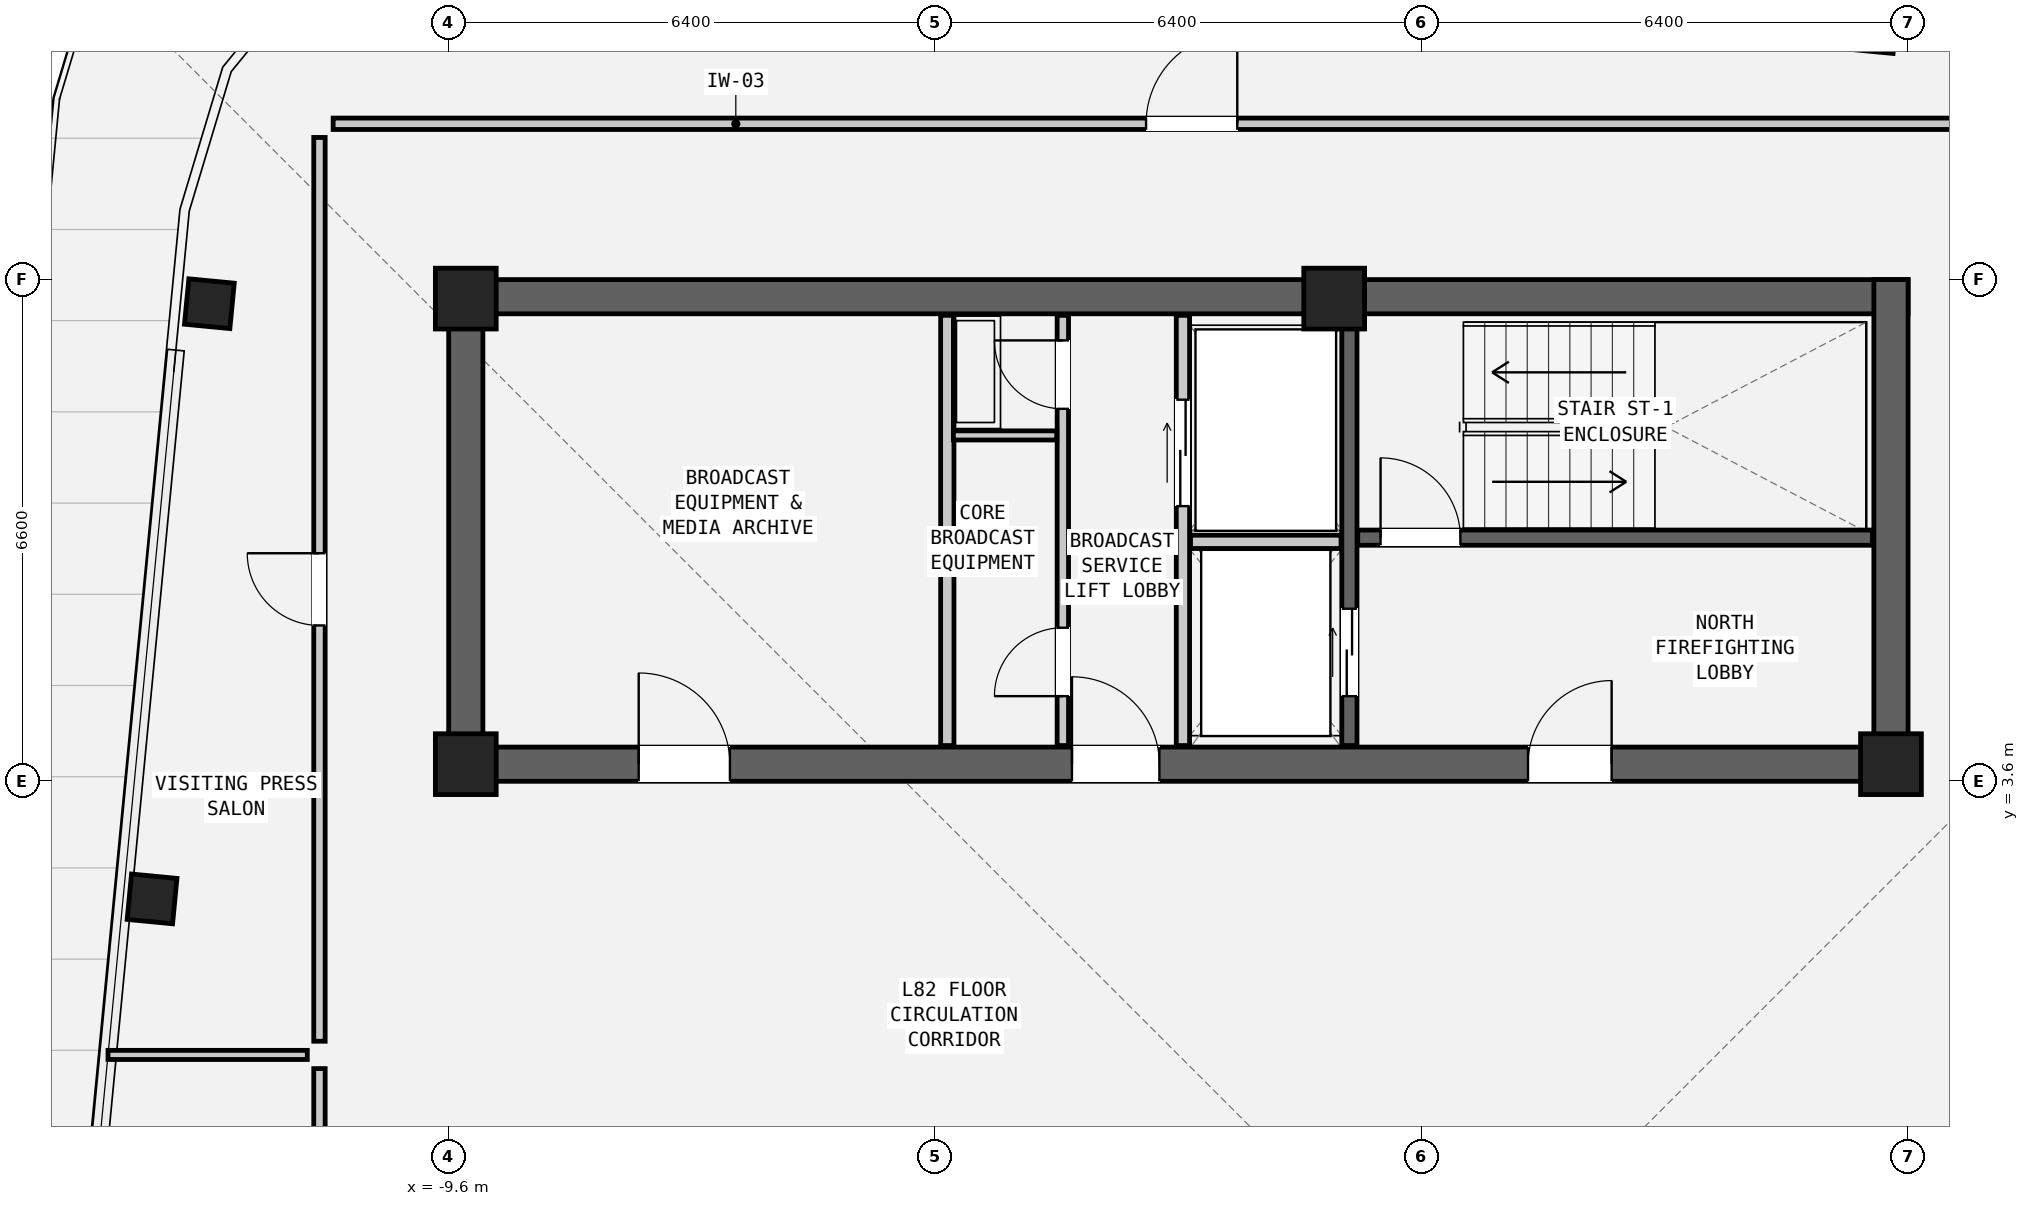
"""IFC4 building model, lengths in metres.
Left out: names, types, materials, properties, quantities, classifications, styles, units other than length and angle.
Written with IfcOpenShell. Run it as: python <this file> out.ifc"""

import sys

from ifc_helpers import new_model, si_unit, direction, frame, frame_2d, origin, origin_2d, place, context, subcontext, project, spatial, rectangle, hollow_rectangle, extrude, element, fill, save


model = new_model("IFC4")
c1 = context("Model", 3, precision=1e-05, world=origin(), true_north=direction((0.0, 1.0)))
c2 = subcontext(c1, "Body", "Model", "MODEL_VIEW")
j1 = project(units=[si_unit("LENGTHUNIT", "METRE"), si_unit("PLANEANGLEUNIT", "RADIAN")], contexts=[c1])
p1 = place(None, origin())
s1 = spatial("IfcSite", under=j1, at=p1, CompositionType="ELEMENT")
p2 = place(p1, origin())
s2 = spatial("IfcBuilding", under=s1, at=p2, CompositionType="ELEMENT")
p3 = place(p2, frame((0.0, 0.0, 276.95)))
s3 = spatial("IfcBuildingStorey", under=s2, at=p3, CompositionType="ELEMENT", Elevation=276.95)
p4 = place(p3, frame((-9.6, 9.975, 0.0), z_axis=(0.0, 0.0, 1.0), x_axis=(1.0, 0.0, 0.0)))
e1 = element("IfcWall", 1, at=p4, inside=s3, PredefinedType="SHEAR", context=c2, shape_type="SweptSolid", body=[
    extrude(rectangle(XDim=19.2, YDim=0.45, at=frame_2d((9.6, 0.0))), origin(), (0.0, 0.0, 1.0), 3.6),
])
p5 = place(p3, frame((-9.6, 3.825, 0.0), z_axis=(0.0, 0.0, 1.0), x_axis=(1.0, 0.0, 0.0)))
e2 = element("IfcWall", 2, at=p5, inside=s3, PredefinedType="SHEAR", context=c2, shape_type="SweptSolid", body=[
    extrude(rectangle(XDim=19.2, YDim=0.45, at=frame_2d((9.6, 0.0))), origin(), (0.0, 0.0, 1.0), 3.6),
])
p6 = place(p5, frame((14.2, 0.0, 0.0)))
e3 = element("IfcOpeningElement", 3, at=p6, cuts=e2, PredefinedType="OPENING", context=c2, shape_type="SweptSolid", body=[
    extrude(rectangle(XDim=1.1, YDim=2.08, at=frame_2d((0.55, 1.04))), frame((0.0, 0.237, 0.0), z_axis=(0.0, -1.0, 0.0), x_axis=(1.0, 0.0, 0.0)), (0.0, 0.0, 1.0), 0.474),
])
p7 = place(p5, frame((8.2, 0.0, 0.0)))
e4 = element("IfcOpeningElement", 4, at=p7, cuts=e2, PredefinedType="OPENING", context=c2, shape_type="SweptSolid", body=[
    extrude(rectangle(XDim=1.15, YDim=2.1, at=frame_2d((0.575, 1.05))), frame((0.0, 0.237, 0.0), z_axis=(0.0, -1.0, 0.0), x_axis=(1.0, 0.0, 0.0)), (0.0, 0.0, 1.0), 0.474),
])
p8 = place(p5, frame((2.5, 0.0, 0.0)))
e5 = element("IfcOpeningElement", 5, at=p8, cuts=e2, PredefinedType="OPENING", context=c2, shape_type="SweptSolid", body=[
    extrude(rectangle(XDim=1.2, YDim=2.1, at=frame_2d((0.6, 1.05))), frame((0.0, 0.237, 0.0), z_axis=(0.0, -1.0, 0.0), x_axis=(1.0, 0.0, 0.0)), (0.0, 0.0, 1.0), 0.474),
])
for number, where, z_axis, x_axis in (
    (6, (-9.375, 3.6, 0.0), (0.0, 0.0, 1.0), (0.0, 1.0, 0.0)),
    (7, (9.375, 3.6, 0.0), (0.0, 0.0, 1.0), (0.0, 1.0, 0.0)),
):
    element("IfcWall", number, at=place(p3, frame(where, z_axis=z_axis, x_axis=x_axis)), inside=s3, PredefinedType="SHEAR", context=c2, shape_type="SweptSolid", body=[
        extrude(rectangle(XDim=6.6, YDim=0.45, at=frame_2d((3.3, 0.0))), origin(), (0.0, 0.0, 1.0), 3.6),
    ])
for number, where, z_axis, x_axis in (
    (8, (9.133, 13.502, 0.0), (0.0, 0.0, 1.0), (0.995, -0.096, 0.0)),
    (9, (-12.749, 9.883, 0.0), (0.0, 0.0, 1.0), (0.096, 0.995, 0.0)),
    (10, (-13.502, 2.052, 0.0), (0.0, 0.0, 1.0), (0.096, 0.995, 0.0)),
):
    element("IfcColumn", number, at=place(p3, frame(where, z_axis=z_axis, x_axis=x_axis)), inside=s3, PredefinedType="COLUMN", context=c2, shape_type="SweptSolid", body=[
        extrude(hollow_rectangle(XDim=0.6, YDim=0.6, WallThickness=0.04, at=origin_2d()), origin(), (0.0, 0.0, 1.0), 3.6),
    ])
for number, where, z_axis, x_axis in (
    (11, (-9.375, 9.95, 0.0), (0.0, 0.0, 1.0), (1.0, 0.0, 0.0)),
    (12, (2.05, 9.95, 0.0), (0.0, 0.0, 1.0), (1.0, 0.0, 0.0)),
    (13, (-9.375, 3.825, 0.0), (0.0, 0.0, 1.0), (1.0, 0.0, 0.0)),
    (14, (9.375, 3.825, 0.0), (0.0, 0.0, 1.0), (1.0, 0.0, 0.0)),
):
    element("IfcColumn", number, at=place(p3, frame(where, z_axis=z_axis, x_axis=x_axis)), inside=s3, PredefinedType="COLUMN", context=c2, shape_type="SweptSolid", body=[
        extrude(rectangle(XDim=0.8, YDim=0.8, at=origin_2d()), origin(), (0.0, 0.0, 1.0), 3.6),
    ])
p9 = place(p3, frame((2.36, 6.805, 0.0), z_axis=(0.0, 0.0, 1.0), x_axis=(1.0, 0.0, 0.0)))
e15 = element("IfcWall", 15, at=p9, inside=s3, PredefinedType="SHEAR", context=c2, shape_type="SweptSolid", body=[
    extrude(rectangle(XDim=6.77, YDim=0.2, at=frame_2d((3.385, 0.0))), origin(), (0.0, 0.0, 1.0), 3.41),
])
p10 = place(p9, frame((0.3, 0.0, 0.0)))
e16 = element("IfcOpeningElement", 16, at=p10, cuts=e15, PredefinedType="OPENING", context=c2, shape_type="SweptSolid", body=[
    extrude(rectangle(XDim=1.05, YDim=2.08, at=frame_2d((0.525, 1.04))), frame((0.0, 0.112, 0.0), z_axis=(0.0, -1.0, 0.0), x_axis=(1.0, 0.0, 0.0)), (0.0, 0.0, 1.0), 0.224),
])
p11 = place(p3, frame((2.25, 4.07, 0.0), z_axis=(0.0, 0.0, 1.0), x_axis=(0.0, 1.0, 0.0)))
e17 = element("IfcWall", 17, at=p11, inside=s3, PredefinedType="SHEAR", context=c2, shape_type="SweptSolid", body=[
    extrude(rectangle(XDim=5.66, YDim=0.2, at=frame_2d((2.83, 0.0))), origin(), (0.0, 0.0, 1.0), 3.41),
])
p12 = place(p11, frame((0.65, 0.0, 0.0)))
e18 = element("IfcOpeningElement", 18, at=p12, cuts=e17, PredefinedType="OPENING", context=c2, shape_type="SweptSolid", body=[
    extrude(rectangle(XDim=1.15, YDim=2.08, at=frame_2d((0.575, 1.04))), frame((0.0, 0.112, 0.0), z_axis=(0.0, -1.0, 0.0), x_axis=(1.0, 0.0, 0.0)), (0.0, 0.0, 1.0), 0.224),
])
p13 = place(p3, frame((0.06, 4.07, 0.0), z_axis=(0.0, 0.0, 1.0), x_axis=(0.0, 1.0, 0.0)))
e19 = element("IfcWall", 19, at=p13, inside=s3, PredefinedType="PARTITIONING", context=c2, shape_type="SweptSolid", body=[
    extrude(rectangle(XDim=5.66, YDim=0.175, at=frame_2d((2.83, 0.0))), origin(), (0.0, 0.0, 1.0), 3.41),
])
p14 = place(p13, frame((3.15, 0.0, 0.0)))
e20 = element("IfcOpeningElement", 20, at=p14, cuts=e19, PredefinedType="OPENING", context=c2, shape_type="SweptSolid", body=[
    extrude(rectangle(XDim=1.4, YDim=2.12, at=frame_2d((0.7, 1.06))), frame((0.0, 0.1, 0.0), z_axis=(0.0, -1.0, 0.0), x_axis=(1.0, 0.0, 0.0)), (0.0, 0.0, 1.0), 0.199),
])
p15 = place(p3, frame((0.16, 6.75, 0.0), z_axis=(0.0, 0.0, 1.0), x_axis=(1.0, 0.0, 0.0)))
e21 = element("IfcWall", 21, at=p15, inside=s3, PredefinedType="PARTITIONING", context=c2, shape_type="SweptSolid", body=[
    extrude(rectangle(XDim=1.98, YDim=0.175, at=frame_2d((0.99, 0.0))), origin(), (0.0, 0.0, 1.0), 3.41),
])
p16 = place(p3, frame((-3.04, 4.07, 0.0), z_axis=(0.0, 0.0, 1.0), x_axis=(0.0, 1.0, 0.0)))
e22 = element("IfcWall", 22, at=p16, inside=s3, PredefinedType="PARTITIONING", context=c2, shape_type="SweptSolid", body=[
    extrude(rectangle(XDim=5.66, YDim=0.175, at=frame_2d((2.83, 0.0))), origin(), (0.0, 0.0, 1.0), 3.41),
])
p17 = place(p3, frame((-1.52, 4.07, 0.0), z_axis=(0.0, 0.0, 1.0), x_axis=(0.0, 1.0, 0.0)))
e23 = element("IfcWall", 23, at=p17, inside=s3, PredefinedType="PARTITIONING", context=c2, shape_type="SweptSolid", body=[
    extrude(rectangle(XDim=5.66, YDim=0.15, at=frame_2d((2.83, 0.0))), origin(), (0.0, 0.0, 1.0), 3.41),
])
p18 = place(p17, frame((4.43, 0.0, 0.0)))
e24 = element("IfcOpeningElement", 24, at=p18, cuts=e23, PredefinedType="OPENING", context=c2, shape_type="SweptSolid", body=[
    extrude(rectangle(XDim=0.9, YDim=2.05, at=frame_2d((0.45, 1.025))), frame((0.0, 0.087, 0.0), z_axis=(0.0, -1.0, 0.0), x_axis=(1.0, 0.0, 0.0)), (0.0, 0.0, 1.0), 0.174),
])
p19 = place(p17, frame((0.65, 0.0, 0.0)))
e25 = element("IfcOpeningElement", 25, at=p19, cuts=e23, PredefinedType="OPENING", context=c2, shape_type="SweptSolid", body=[
    extrude(rectangle(XDim=0.9, YDim=2.05, at=frame_2d((0.45, 1.025))), frame((0.0, 0.087, 0.0), z_axis=(0.0, -1.0, 0.0), x_axis=(1.0, 0.0, 0.0)), (0.0, 0.0, 1.0), 0.174),
])
p20 = place(p3, frame((-2.96, 8.15, 0.0), z_axis=(0.0, 0.0, 1.0), x_axis=(1.0, 0.0, 0.0)))
e26 = element("IfcWall", 26, at=p20, inside=s3, PredefinedType="PARTITIONING", context=c2, shape_type="SweptSolid", body=[
    extrude(rectangle(XDim=1.36, YDim=0.12, at=frame_2d((0.68, 0.0))), origin(), (0.0, 0.0, 1.0), 3.41),
])
p21 = place(p3, frame((-14.082, 0.0, 0.0), z_axis=(0.0, 0.0, 1.0), x_axis=(1.0, 0.0, 0.0)))
e27 = element("IfcWall", 27, at=p21, inside=s3, PredefinedType="PARTITIONING", context=c2, shape_type="SweptSolid", body=[
    extrude(rectangle(XDim=2.622, YDim=0.12, at=frame_2d((1.311, 0.0))), origin(), (0.0, 0.0, 1.0), 3.41),
])
p22 = place(p3, frame((-11.12, 12.25, 0.0), z_axis=(0.0, 0.0, 1.0), x_axis=(1.0, 0.0, 0.0)))
e28 = element("IfcWall", 28, at=p22, inside=s3, PredefinedType="PARTITIONING", context=c2, shape_type="SweptSolid", body=[
    extrude(rectangle(XDim=22.59, YDim=0.15, at=frame_2d((11.295, 0.0))), origin(), (0.0, 0.0, 1.0), 3.41),
])
p23 = place(p22, frame((10.695, 0.0, 0.0)))
e29 = element("IfcOpeningElement", 29, at=p23, cuts=e28, PredefinedType="OPENING", context=c2, shape_type="SweptSolid", body=[
    extrude(rectangle(XDim=1.2, YDim=2.1, at=frame_2d((0.6, 1.05))), frame((0.0, 0.087, 0.0), z_axis=(0.0, -1.0, 0.0), x_axis=(1.0, 0.0, 0.0)), (0.0, 0.0, 1.0), 0.174),
])
p24 = place(p3, frame((-11.3, -10.87, 0.0), z_axis=(0.0, 0.0, 1.0), x_axis=(0.0, 1.0, 0.0)))
e30 = element("IfcWall", 30, at=p24, inside=s3, PredefinedType="PARTITIONING", context=c2, shape_type="SweptSolid", body=[
    extrude(rectangle(XDim=10.69, YDim=0.15, at=frame_2d((5.345, 0.0))), origin(), (0.0, 0.0, 1.0), 3.41),
])
p25 = place(p24, frame((4.745, 0.0, 0.0)))
e31 = element("IfcOpeningElement", 31, at=p25, cuts=e30, PredefinedType="OPENING", context=c2, shape_type="SweptSolid", body=[
    extrude(rectangle(XDim=1.2, YDim=2.1, at=frame_2d((0.6, 1.05))), frame((0.0, 0.087, 0.0), z_axis=(0.0, -1.0, 0.0), x_axis=(1.0, 0.0, 0.0)), (0.0, 0.0, 1.0), 0.174),
])
p26 = place(p3, frame((-11.3, 0.18, 0.0), z_axis=(0.0, 0.0, 1.0), x_axis=(0.0, 1.0, 0.0)))
e32 = element("IfcWall", 32, at=p26, inside=s3, PredefinedType="PARTITIONING", context=c2, shape_type="SweptSolid", body=[
    extrude(rectangle(XDim=11.89, YDim=0.15, at=frame_2d((5.945, 0.0))), origin(), (0.0, 0.0, 1.0), 3.41),
])
p27 = place(p26, frame((5.47, 0.0, 0.0)))
e33 = element("IfcOpeningElement", 33, at=p27, cuts=e32, PredefinedType="OPENING", context=c2, shape_type="SweptSolid", body=[
    extrude(rectangle(XDim=0.95, YDim=2.1, at=frame_2d((0.475, 1.05))), frame((0.0, 0.087, 0.0), z_axis=(0.0, -1.0, 0.0), x_axis=(1.0, 0.0, 0.0)), (0.0, 0.0, 1.0), 0.174),
])
p28 = place(p10, origin())
e34 = element("IfcDoor", 34, at=p28, inside=s3, OperationType="SINGLE_SWING_LEFT", PredefinedType="DOOR", context=c2, shape_type="SweptSolid", body=[
    extrude(rectangle(XDim=1.05, YDim=2.08, at=frame_2d((0.525, 1.04))), frame((0.0, 0.025, 0.0), z_axis=(0.0, -1.0, 0.0), x_axis=(1.0, 0.0, 0.0)), (0.0, 0.0, 1.0), 0.05),
])
fill(e16, e34)
p29 = place(p6, origin())
e35 = element("IfcDoor", 35, at=p29, inside=s3, OperationType="SINGLE_SWING_RIGHT", PredefinedType="DOOR", context=c2, shape_type="SweptSolid", body=[
    extrude(rectangle(XDim=1.1, YDim=2.08, at=frame_2d((0.55, 1.04))), frame((0.0, 0.025, 0.0), z_axis=(0.0, -1.0, 0.0), x_axis=(1.0, 0.0, 0.0)), (0.0, 0.0, 1.0), 0.05),
])
fill(e3, e35)
p30 = place(p12, origin())
e36 = element("IfcDoor", 36, at=p30, inside=s3, OperationType="DOUBLE_DOOR_SLIDING", PredefinedType="DOOR", context=c2, shape_type="SweptSolid", body=[
    extrude(rectangle(XDim=1.15, YDim=2.08, at=frame_2d((0.575, 1.04))), frame((0.0, 0.025, 0.0), z_axis=(0.0, -1.0, 0.0), x_axis=(1.0, 0.0, 0.0)), (0.0, 0.0, 1.0), 0.05),
])
fill(e18, e36)
p31 = place(p14, origin())
e37 = element("IfcDoor", 37, at=p31, inside=s3, OperationType="DOUBLE_DOOR_SLIDING", PredefinedType="DOOR", context=c2, shape_type="SweptSolid", body=[
    extrude(rectangle(XDim=1.4, YDim=2.12, at=frame_2d((0.7, 1.06))), frame((0.0, 0.025, 0.0), z_axis=(0.0, -1.0, 0.0), x_axis=(1.0, 0.0, 0.0)), (0.0, 0.0, 1.0), 0.05),
])
fill(e20, e37)
p32 = place(p7, origin())
e38 = element("IfcDoor", 38, at=p32, inside=s3, OperationType="SINGLE_SWING_LEFT", PredefinedType="DOOR", context=c2, shape_type="SweptSolid", body=[
    extrude(rectangle(XDim=1.15, YDim=2.1, at=frame_2d((0.575, 1.05))), frame((0.0, 0.025, 0.0), z_axis=(0.0, -1.0, 0.0), x_axis=(1.0, 0.0, 0.0)), (0.0, 0.0, 1.0), 0.05),
])
fill(e4, e38)
p33 = place(p18, origin())
e39 = element("IfcDoor", 39, at=p33, inside=s3, OperationType="SINGLE_SWING_RIGHT", PredefinedType="DOOR", context=c2, shape_type="SweptSolid", body=[
    extrude(rectangle(XDim=0.9, YDim=2.05, at=frame_2d((0.45, 1.025))), frame((0.0, 0.025, 0.0), z_axis=(0.0, -1.0, 0.0), x_axis=(1.0, 0.0, 0.0)), (0.0, 0.0, 1.0), 0.05),
])
fill(e24, e39)
p34 = place(p19, origin())
e40 = element("IfcDoor", 40, at=p34, inside=s3, OperationType="SINGLE_SWING_LEFT", PredefinedType="DOOR", context=c2, shape_type="SweptSolid", body=[
    extrude(rectangle(XDim=0.9, YDim=2.05, at=frame_2d((0.45, 1.025))), frame((0.0, 0.025, 0.0), z_axis=(0.0, -1.0, 0.0), x_axis=(1.0, 0.0, 0.0)), (0.0, 0.0, 1.0), 0.05),
])
fill(e25, e40)
p35 = place(p8, origin())
e41 = element("IfcDoor", 41, at=p35, inside=s3, OperationType="SINGLE_SWING_LEFT", PredefinedType="DOOR", context=c2, shape_type="SweptSolid", body=[
    extrude(rectangle(XDim=1.2, YDim=2.1, at=frame_2d((0.6, 1.05))), frame((0.0, 0.025, 0.0), z_axis=(0.0, -1.0, 0.0), x_axis=(1.0, 0.0, 0.0)), (0.0, 0.0, 1.0), 0.05),
])
fill(e5, e41)
p36 = place(p23, origin())
e42 = element("IfcDoor", 42, at=p36, inside=s3, OperationType="SINGLE_SWING_RIGHT", PredefinedType="DOOR", context=c2, shape_type="SweptSolid", body=[
    extrude(rectangle(XDim=1.2, YDim=2.1, at=frame_2d((0.6, 1.05))), frame((0.0, 0.025, 0.0), z_axis=(0.0, -1.0, 0.0), x_axis=(1.0, 0.0, 0.0)), (0.0, 0.0, 1.0), 0.05),
])
fill(e29, e42)
p37 = place(p27, origin())
e43 = element("IfcDoor", 43, at=p37, inside=s3, OperationType="SINGLE_SWING_RIGHT", PredefinedType="DOOR", context=c2, shape_type="SweptSolid", body=[
    extrude(rectangle(XDim=0.95, YDim=2.1, at=frame_2d((0.475, 1.05))), frame((0.0, 0.025, 0.0), z_axis=(0.0, -1.0, 0.0), x_axis=(1.0, 0.0, 0.0)), (0.0, 0.0, 1.0), 0.05),
])
fill(e33, e43)
save(model, sys.argv[1])
